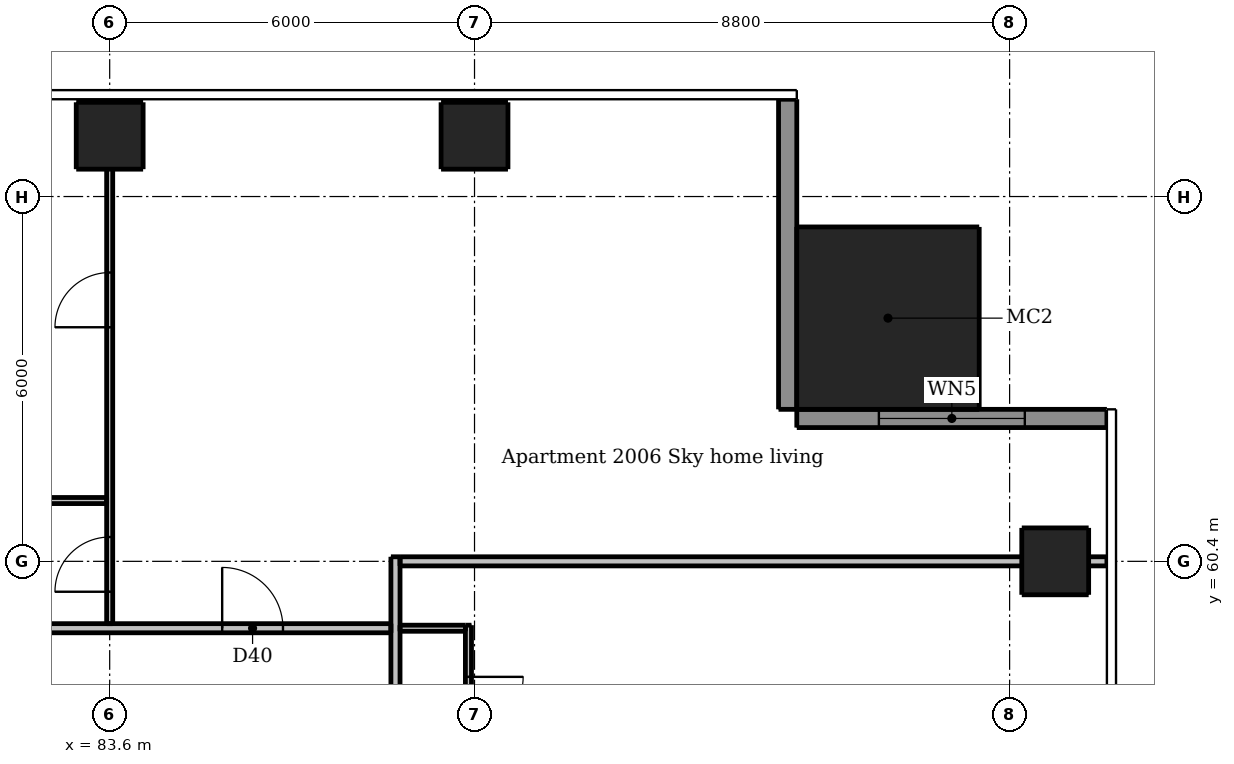
"""IFC4 building model, lengths in metres.
Left out: names, types, materials, properties, quantities, classifications, styles, units other than length and angle.
Written with IfcOpenShell. Run it as: python <this file> out.ifc"""

import sys

from ifc_helpers import new_model, si_unit, direction, frame, frame_2d, origin, origin_2d, place, context, subcontext, project, spatial, rectangle, extrude, element, fill, save


model = new_model("IFC4")
c1 = context("Model", 3, precision=1e-05, world=origin(), true_north=direction((0.0, 1.0)))
c2 = subcontext(c1, "Body", "Model", "MODEL_VIEW")
j1 = project(units=[si_unit("LENGTHUNIT", "METRE"), si_unit("PLANEANGLEUNIT", "RADIAN")], contexts=[c1])
p1 = place(None, origin())
s1 = spatial("IfcSite", under=j1, at=p1, CompositionType="ELEMENT")
p2 = place(p1, origin())
s2 = spatial("IfcBuilding", under=s1, at=p2, CompositionType="ELEMENT")
p3 = place(p2, frame((0.0, 0.0, 78.7)))
s3 = spatial("IfcBuildingStorey", under=s2, at=p3, CompositionType="ELEMENT", Elevation=78.7)
for number, where, z_axis, x_axis in (
    (1, (99.15, 60.4, 0.0), (0.0, 0.0, 1.0), (1.0, 0.0, 0.0)),
    (2, (83.6, 67.4, 0.0), (0.0, 0.0, 1.0), (1.0, 0.0, 0.0)),
    (3, (89.6, 67.4, 0.0), (0.0, 0.0, 1.0), (1.0, 0.0, 0.0)),
):
    element("IfcColumn", number, at=place(p3, frame(where, z_axis=z_axis, x_axis=x_axis)), inside=s3, PredefinedType="COLUMN", context=c2, shape_type="SweptSolid", body=[
        extrude(rectangle(XDim=1.1, YDim=1.1, at=origin_2d()), origin(), (0.0, 0.0, 1.0), 3.05),
    ])
p4 = place(p3, frame((96.4, 64.4, 0.0), z_axis=(0.0, 0.0, 1.0), x_axis=(1.0, 0.0, 0.0)))
e4 = element("IfcColumn", 4, at=p4, inside=s3, PredefinedType="COLUMN", context=c2, shape_type="SweptSolid", body=[
    extrude(rectangle(XDim=3.0, YDim=3.0, at=origin_2d()), origin(), (0.0, 0.0, 1.0), 3.3),
])
p5 = place(p3, frame((100.0, 62.75, 0.0), z_axis=(0.0, 0.0, 1.0), x_axis=(-1.0, 0.0, 0.0)))
e5 = element("IfcWall", 5, at=p5, inside=s3, PredefinedType="SOLIDWALL", context=c2, shape_type="SweptSolid", body=[
    extrude(rectangle(XDim=5.1, YDim=0.3, at=frame_2d((2.55, 0.0))), origin(), (0.0, 0.0, 1.0), 3.05),
])
p6 = place(p5, frame((1.35, 0.0, 0.15)))
e6 = element("IfcOpeningElement", 6, at=p6, cuts=e5, PredefinedType="OPENING", context=c2, shape_type="SweptSolid", body=[
    extrude(rectangle(XDim=2.4, YDim=2.1, at=frame_2d((1.2, 1.05))), frame((0.0, 0.16, 0.0), z_axis=(0.0, -1.0, 0.0), x_axis=(1.0, 0.0, 0.0)), (0.0, 0.0, 1.0), 0.32),
])
p7 = place(p3, frame((94.75, 62.9, 0.0), z_axis=(0.0, 0.0, 1.0), x_axis=(0.0, 1.0, 0.0)))
e7 = element("IfcWall", 7, at=p7, inside=s3, PredefinedType="SOLIDWALL", context=c2, shape_type="SweptSolid", body=[
    extrude(rectangle(XDim=5.1, YDim=0.3, at=frame_2d((2.55, 0.0))), origin(), (0.0, 0.0, 1.0), 3.05),
])
p8 = place(p3, frame((83.6, 59.375, 0.0), z_axis=(0.0, 0.0, 1.0), x_axis=(0.0, 1.0, 0.0)))
e8 = element("IfcWall", 8, at=p8, inside=s3, PredefinedType="PARTITIONING", context=c2, shape_type="SweptSolid", body=[
    extrude(rectangle(XDim=8.625, YDim=0.1, at=frame_2d((4.312, 0.0))), origin(), (0.0, 0.0, 1.0), 2.516),
])
p9 = place(p8, frame((0.525, 0.0, 0.0)))
e9 = element("IfcOpeningElement", 9, at=p9, cuts=e8, PredefinedType="OPENING", context=c2, shape_type="SweptSolid", body=[
    extrude(rectangle(XDim=0.9, YDim=2.1, at=frame_2d((0.45, 1.05))), frame((0.0, 0.06, 0.0), z_axis=(0.0, -1.0, 0.0), x_axis=(1.0, 0.0, 0.0)), (0.0, 0.0, 1.0), 0.12),
])
p10 = place(p8, frame((4.875, 0.0, 0.0)))
e10 = element("IfcOpeningElement", 10, at=p10, cuts=e8, PredefinedType="OPENING", context=c2, shape_type="SweptSolid", body=[
    extrude(rectangle(XDim=0.9, YDim=2.1, at=frame_2d((0.45, 1.05))), frame((0.0, 0.06, 0.0), z_axis=(0.0, -1.0, 0.0), x_axis=(1.0, 0.0, 0.0)), (0.0, 0.0, 1.0), 0.12),
])
p11 = place(p3, frame((89.5, 59.35, 0.0), z_axis=(0.0, 0.0, 1.0), x_axis=(0.0, -1.0, 0.0)))
e11 = element("IfcWall", 11, at=p11, inside=s3, PredefinedType="PARTITIONING", context=c2, shape_type="SweptSolid", body=[
    extrude(rectangle(XDim=19.775, YDim=0.1, at=frame_2d((9.888, 0.0))), origin(), (0.0, 0.0, 1.0), 2.51),
])
p12 = place(p11, frame((14.95, 0.0, 0.0)))
e12 = element("IfcOpeningElement", 12, at=p12, cuts=e11, PredefinedType="OPENING", context=c2, shape_type="SweptSolid", body=[
    extrude(rectangle(XDim=0.9, YDim=2.1, at=frame_2d((0.45, 1.05))), frame((0.0, 0.06, 0.0), z_axis=(0.0, -1.0, 0.0), x_axis=(1.0, 0.0, 0.0)), (0.0, 0.0, 1.0), 0.12),
])
p13 = place(p11, frame((9.0, 0.0, 0.0)))
e13 = element("IfcOpeningElement", 13, at=p13, cuts=e11, PredefinedType="OPENING", context=c2, shape_type="SweptSolid", body=[
    extrude(rectangle(XDim=0.9, YDim=2.1, at=frame_2d((0.45, 1.05))), frame((0.0, 0.06, 0.0), z_axis=(0.0, -1.0, 0.0), x_axis=(1.0, 0.0, 0.0)), (0.0, 0.0, 1.0), 0.12),
])
p14 = place(p11, frame((11.4, 0.0, 0.0)))
e14 = element("IfcOpeningElement", 14, at=p14, cuts=e11, PredefinedType="OPENING", context=c2, shape_type="SweptSolid", body=[
    extrude(rectangle(XDim=0.9, YDim=2.1, at=frame_2d((0.45, 1.05))), frame((0.0, 0.06, 0.0), z_axis=(0.0, -1.0, 0.0), x_axis=(1.0, 0.0, 0.0)), (0.0, 0.0, 1.0), 0.12),
])
p15 = place(p11, frame((18.5, 0.0, 0.0)))
e15 = element("IfcOpeningElement", 15, at=p15, cuts=e11, PredefinedType="OPENING", context=c2, shape_type="SweptSolid", body=[
    extrude(rectangle(XDim=0.9, YDim=2.1, at=frame_2d((0.45, 1.05))), frame((0.0, 0.06, 0.0), z_axis=(0.0, -1.0, 0.0), x_axis=(1.0, 0.0, 0.0)), (0.0, 0.0, 1.0), 0.12),
])
p16 = place(p11, frame((6.0, 0.0, 0.0)))
e16 = element("IfcOpeningElement", 16, at=p16, cuts=e11, PredefinedType="OPENING", context=c2, shape_type="SweptSolid", body=[
    extrude(rectangle(XDim=0.9, YDim=2.1, at=frame_2d((0.45, 1.05))), frame((0.0, 0.06, 0.0), z_axis=(0.0, -1.0, 0.0), x_axis=(1.0, 0.0, 0.0)), (0.0, 0.0, 1.0), 0.12),
])
p17 = place(p11, frame((0.85, 0.0, 0.0)))
e17 = element("IfcOpeningElement", 17, at=p17, cuts=e11, PredefinedType="OPENING", context=c2, shape_type="SweptSolid", body=[
    extrude(rectangle(XDim=0.9, YDim=2.1, at=frame_2d((0.45, 1.05))), frame((0.0, 0.06, 0.0), z_axis=(0.0, -1.0, 0.0), x_axis=(1.0, 0.0, 0.0)), (0.0, 0.0, 1.0), 0.12),
])
p18 = place(p11, frame((3.35, 0.0, 0.0)))
e18 = element("IfcOpeningElement", 18, at=p18, cuts=e11, PredefinedType="OPENING", context=c2, shape_type="SweptSolid", body=[
    extrude(rectangle(XDim=0.8, YDim=2.1, at=frame_2d((0.4, 1.05))), frame((0.0, 0.06, 0.0), z_axis=(0.0, -1.0, 0.0), x_axis=(1.0, 0.0, 0.0)), (0.0, 0.0, 1.0), 0.12),
])
p19 = place(p3, frame((83.55, 61.4, 0.0), z_axis=(0.0, 0.0, 1.0), x_axis=(-1.0, 0.0, 0.0)))
e19 = element("IfcWall", 19, at=p19, inside=s3, PredefinedType="PARTITIONING", context=c2, shape_type="SweptSolid", body=[
    extrude(rectangle(XDim=5.875, YDim=0.1, at=frame_2d((2.938, 0.0))), origin(), (0.0, 0.0, 1.0), 3.05),
])
p20 = place(p19, frame((3.75, 0.0, 0.0)))
e20 = element("IfcOpeningElement", 20, at=p20, cuts=e19, PredefinedType="OPENING", context=c2, shape_type="SweptSolid", body=[
    extrude(rectangle(XDim=0.8, YDim=2.1, at=frame_2d((0.4, 1.05))), frame((0.0, 0.06, 0.0), z_axis=(0.0, -1.0, 0.0), x_axis=(1.0, 0.0, 0.0)), (0.0, 0.0, 1.0), 0.12),
])
p21 = place(p3, frame((88.375, 59.3, 0.0), z_axis=(0.0, 0.0, 1.0), x_axis=(1.0, 0.0, 0.0)))
e21 = element("IfcWall", 21, at=p21, inside=s3, PredefinedType="PARTITIONING", context=c2, shape_type="SweptSolid", body=[
    extrude(rectangle(XDim=1.075, YDim=0.1, at=frame_2d((0.538, 0.0))), origin(), (0.0, 0.0, 1.0), 3.05),
])
p22 = place(p3, frame((88.3, 60.475, 0.0), z_axis=(0.0, 0.0, 1.0), x_axis=(0.0, -1.0, 0.0)))
e22 = element("IfcWall", 22, at=p22, inside=s3, PredefinedType="PARTITIONING", context=c2, shape_type="SweptSolid", body=[
    extrude(rectangle(XDim=28.7, YDim=0.15, at=frame_2d((14.35, 0.0))), origin(), (0.0, 0.0, 1.0), 3.05),
])
p23 = place(p22, frame((27.425, 0.0, 0.0)))
e23 = element("IfcOpeningElement", 23, at=p23, cuts=e22, PredefinedType="OPENING", context=c2, shape_type="SweptSolid", body=[
    extrude(rectangle(XDim=1.0, YDim=2.1, at=frame_2d((0.5, 1.05))), frame((0.0, 0.085, 0.0), z_axis=(0.0, -1.0, 0.0), x_axis=(1.0, 0.0, 0.0)), (0.0, 0.0, 1.0), 0.17),
])
p24 = place(p22, frame((10.575, 0.0, 0.0)))
e24 = element("IfcOpeningElement", 24, at=p24, cuts=e22, PredefinedType="OPENING", context=c2, shape_type="SweptSolid", body=[
    extrude(rectangle(XDim=1.0, YDim=2.1, at=frame_2d((0.5, 1.05))), frame((0.0, 0.085, 0.0), z_axis=(0.0, -1.0, 0.0), x_axis=(1.0, 0.0, 0.0)), (0.0, 0.0, 1.0), 0.17),
])
p25 = place(p3, frame((88.375, 60.4, 0.0), z_axis=(0.0, 0.0, 1.0), x_axis=(1.0, 0.0, 0.0)))
e25 = element("IfcWall", 25, at=p25, inside=s3, PredefinedType="PARTITIONING", context=c2, shape_type="SweptSolid", body=[
    extrude(rectangle(XDim=11.625, YDim=0.15, at=frame_2d((5.812, 0.0))), origin(), (0.0, 0.0, 1.0), 2.516),
])
p26 = place(p3, frame((59.675, 59.3, 0.0), z_axis=(0.0, 0.0, 1.0), x_axis=(1.0, 0.0, 0.0)))
e26 = element("IfcWall", 26, at=p26, inside=s3, PredefinedType="PARTITIONING", context=c2, shape_type="SweptSolid", body=[
    extrude(rectangle(XDim=28.55, YDim=0.15, at=frame_2d((14.275, 0.0))), origin(), (0.0, 0.0, 1.0), 3.05),
])
p27 = place(p26, frame((8.975, 0.0, 0.0)))
e27 = element("IfcOpeningElement", 27, at=p27, cuts=e26, PredefinedType="OPENING", context=c2, shape_type="SweptSolid", body=[
    extrude(rectangle(XDim=1.0, YDim=2.1, at=frame_2d((0.5, 1.05))), frame((0.0, 0.085, 0.0), z_axis=(0.0, -1.0, 0.0), x_axis=(1.0, 0.0, 0.0)), (0.0, 0.0, 1.0), 0.17),
])
p28 = place(p26, frame((25.775, 0.0, 0.0)))
e28 = element("IfcOpeningElement", 28, at=p28, cuts=e26, PredefinedType="OPENING", context=c2, shape_type="SweptSolid", body=[
    extrude(rectangle(XDim=1.0, YDim=2.1, at=frame_2d((0.5, 1.05))), frame((0.0, 0.085, 0.0), z_axis=(0.0, -1.0, 0.0), x_axis=(1.0, 0.0, 0.0)), (0.0, 0.0, 1.0), 0.17),
])
p29 = place(p6, origin())
e29 = element("IfcWindow", 29, at=p29, inside=s3, PartitioningType="DOUBLE_PANEL_VERTICAL", PredefinedType="WINDOW", context=c2, shape_type="SweptSolid", body=[
    extrude(rectangle(XDim=2.4, YDim=2.1, at=frame_2d((1.2, 1.05))), frame((0.0, 0.03, 0.0), z_axis=(0.0, -1.0, 0.0), x_axis=(1.0, 0.0, 0.0)), (0.0, 0.0, 1.0), 0.06),
])
fill(e6, e29)
p30 = place(p17, origin())
e30 = element("IfcDoor", 30, at=p30, inside=s3, OperationType="SINGLE_SWING_LEFT", PredefinedType="DOOR", context=c2, shape_type="SweptSolid", body=[
    extrude(rectangle(XDim=0.9, YDim=2.1, at=frame_2d((0.45, 1.05))), frame((0.0, 0.025, 0.0), z_axis=(0.0, -1.0, 0.0), x_axis=(1.0, 0.0, 0.0)), (0.0, 0.0, 1.0), 0.05),
])
fill(e17, e30)
p31 = place(p28, origin())
e31 = element("IfcDoor", 31, at=p31, inside=s3, OperationType="SINGLE_SWING_LEFT", PredefinedType="DOOR", context=c2, shape_type="SweptSolid", body=[
    extrude(rectangle(XDim=1.0, YDim=2.1, at=frame_2d((0.5, 1.05))), frame((0.0, 0.025, 0.0), z_axis=(0.0, -1.0, 0.0), x_axis=(1.0, 0.0, 0.0)), (0.0, 0.0, 1.0), 0.05),
])
fill(e28, e31)
p32 = place(p9, origin())
e32 = element("IfcDoor", 32, at=p32, inside=s3, OperationType="SINGLE_SWING_LEFT", PredefinedType="DOOR", context=c2, shape_type="SweptSolid", body=[
    extrude(rectangle(XDim=0.9, YDim=2.1, at=frame_2d((0.45, 1.05))), frame((0.0, 0.025, 0.0), z_axis=(0.0, -1.0, 0.0), x_axis=(1.0, 0.0, 0.0)), (0.0, 0.0, 1.0), 0.05),
])
fill(e9, e32)
p33 = place(p10, origin())
e33 = element("IfcDoor", 33, at=p33, inside=s3, OperationType="SINGLE_SWING_LEFT", PredefinedType="DOOR", context=c2, shape_type="SweptSolid", body=[
    extrude(rectangle(XDim=0.9, YDim=2.1, at=frame_2d((0.45, 1.05))), frame((0.0, 0.025, 0.0), z_axis=(0.0, -1.0, 0.0), x_axis=(1.0, 0.0, 0.0)), (0.0, 0.0, 1.0), 0.05),
])
fill(e10, e33)
save(model, sys.argv[1])
